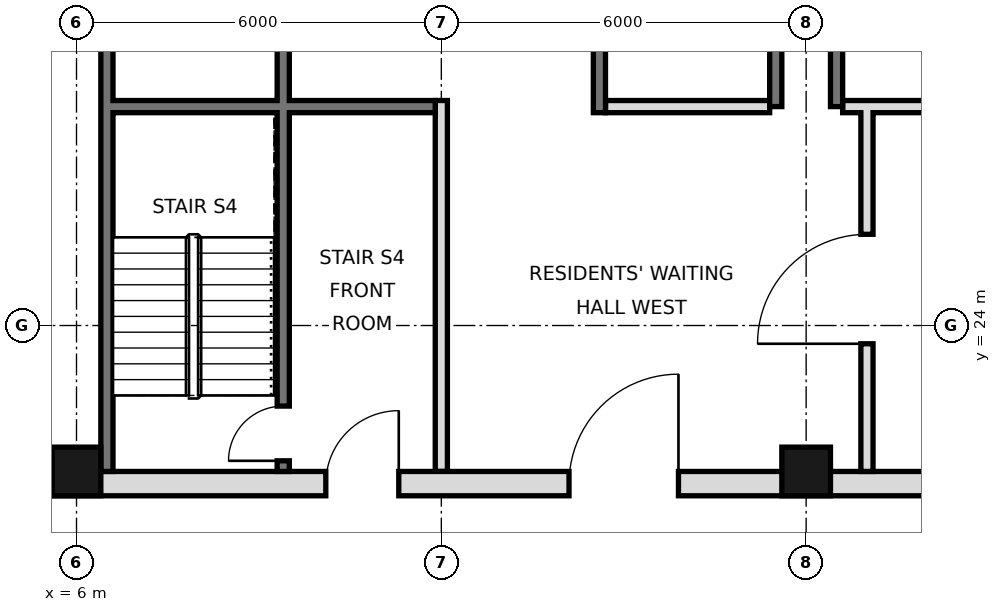
"""IFC4 building model, lengths in metres.
Left out: names, types, materials, properties, quantities, classifications, styles, units other than length and angle.
Written with IfcOpenShell. Run it as: python <this file> out.ifc"""

import sys

from ifc_helpers import new_model, si_unit, direction, frame, frame_2d, origin, origin_2d, place, context, subcontext, project, spatial, rectangle, hollow_rectangle, extrude, element, fill, save


model = new_model("IFC4")
c1 = context("Model", 3, precision=1e-05, world=origin(), true_north=direction((0.0, 1.0)))
c2 = subcontext(c1, "Body", "Model", "MODEL_VIEW")
j1 = project(units=[si_unit("LENGTHUNIT", "METRE"), si_unit("PLANEANGLEUNIT", "RADIAN")], contexts=[c1])
p1 = place(None, origin())
s1 = spatial("IfcSite", under=j1, at=p1, CompositionType="ELEMENT")
p2 = place(p1, origin())
s2 = spatial("IfcBuilding", under=s1, at=p2, CompositionType="ELEMENT")
p3 = place(p2, frame((0.0, 0.0, 316.0)))
s3 = spatial("IfcBuildingStorey", under=s2, at=p3, CompositionType="ELEMENT", Elevation=316.0)
for number, where, z_axis, x_axis in (
    (1, (6.0, 21.6, 0.0), (0.0, 0.0, 1.0), (1.0, 0.0, 0.0)),
    (2, (18.0, 21.6, 0.0), (0.0, 0.0, 1.0), (1.0, 0.0, 0.0)),
):
    element("IfcColumn", number, at=place(p3, frame(where, z_axis=z_axis, x_axis=x_axis)), inside=s3, PredefinedType="COLUMN", context=c2, shape_type="SweptSolid", body=[
        extrude(hollow_rectangle(XDim=0.8, YDim=0.8, WallThickness=0.025, at=origin_2d()), origin(), (0.0, 0.0, 1.0), 3.6),
    ])
p4 = place(p3, frame((6.5, 21.6, 0.0), z_axis=(0.0, 0.0, 1.0), x_axis=(0.0, 1.0, 0.0)))
e3 = element("IfcWall", 3, at=p4, inside=s3, PredefinedType="SOLIDWALL", context=c2, shape_type="SweptSolid", body=[
    extrude(rectangle(XDim=23.5, YDim=0.2, at=frame_2d((11.75, 0.0))), origin(), (0.0, 0.0, 1.0), 3.42),
])
for number, where, z_axis, x_axis in (
    (4, (17.5, 27.6, 0.0), (0.0, 0.0, 1.0), (0.0, 1.0, 0.0)),
    (5, (18.5, 27.6, 0.0), (0.0, 0.0, 1.0), (0.0, 1.0, 0.0)),
):
    element("IfcWall", number, at=place(p3, frame(where, z_axis=z_axis, x_axis=x_axis)), inside=s3, PredefinedType="SOLIDWALL", context=c2, shape_type="SweptSolid", body=[
        extrude(rectangle(XDim=17.5, YDim=0.2, at=frame_2d((8.75, 0.0))), origin(), (0.0, 0.0, 1.0), 3.42),
    ])
p5 = place(p3, frame((5.6, 21.4, 0.0), z_axis=(0.0, 0.0, 1.0), x_axis=(1.0, 0.0, 0.0)))
e6 = element("IfcWall", 6, at=p5, inside=s3, PredefinedType="SOLIDWALL", context=c2, shape_type="SweptSolid", body=[
    extrude(rectangle(XDim=36.8, YDim=0.4, at=frame_2d((18.4, 0.0))), origin(), (0.0, 0.0, 1.0), 3.42),
])
p6 = place(p5, frame((8.5, 0.0, 0.0)))
e7 = element("IfcOpeningElement", 7, at=p6, cuts=e6, PredefinedType="OPENING", context=c2, shape_type="SweptSolid", body=[
    extrude(rectangle(XDim=1.8, YDim=2.1, at=frame_2d((0.9, 1.05))), frame((0.0, 0.21, 0.0), z_axis=(0.0, -1.0, 0.0), x_axis=(1.0, 0.0, 0.0)), (0.0, 0.0, 1.0), 0.42),
])
p7 = place(p5, frame((17.5, 0.0, 0.0)))
e8 = element("IfcOpeningElement", 8, at=p7, cuts=e6, PredefinedType="OPENING", context=c2, shape_type="SweptSolid", body=[
    extrude(rectangle(XDim=1.8, YDim=2.1, at=frame_2d((0.9, 1.05))), frame((0.0, 0.21, 0.0), z_axis=(0.0, -1.0, 0.0), x_axis=(1.0, 0.0, 0.0)), (0.0, 0.0, 1.0), 0.42),
])
p8 = place(p5, frame((26.5, 0.0, 0.0)))
e9 = element("IfcOpeningElement", 9, at=p8, cuts=e6, PredefinedType="OPENING", context=c2, shape_type="SweptSolid", body=[
    extrude(rectangle(XDim=1.8, YDim=2.1, at=frame_2d((0.9, 1.05))), frame((0.0, 0.21, 0.0), z_axis=(0.0, -1.0, 0.0), x_axis=(1.0, 0.0, 0.0)), (0.0, 0.0, 1.0), 0.42),
])
p9 = place(p5, frame((4.5, 0.0, 0.0)))
e10 = element("IfcOpeningElement", 10, at=p9, cuts=e6, PredefinedType="OPENING", context=c2, shape_type="SweptSolid", body=[
    extrude(rectangle(XDim=1.2, YDim=2.1, at=frame_2d((0.6, 1.05))), frame((0.0, 0.21, 0.0), z_axis=(0.0, -1.0, 0.0), x_axis=(1.0, 0.0, 0.0)), (0.0, 0.0, 1.0), 0.42),
])
p10 = place(p5, frame((31.1, 0.0, 0.0)))
e11 = element("IfcOpeningElement", 11, at=p10, cuts=e6, PredefinedType="OPENING", context=c2, shape_type="SweptSolid", body=[
    extrude(rectangle(XDim=1.2, YDim=2.1, at=frame_2d((0.6, 1.05))), frame((0.0, 0.21, 0.0), z_axis=(0.0, -1.0, 0.0), x_axis=(1.0, 0.0, 0.0)), (0.0, 0.0, 1.0), 0.42),
])
p11 = place(p3, frame((19.0, 21.6, 0.0), z_axis=(0.0, 0.0, 1.0), x_axis=(0.0, 1.0, 0.0)))
e12 = element("IfcWall", 12, at=p11, inside=s3, PredefinedType="PARTITIONING", context=c2, shape_type="SweptSolid", body=[
    extrude(rectangle(XDim=6.0, YDim=0.2, at=frame_2d((3.0, 0.0))), origin(), (0.0, 0.0, 1.0), 3.42),
])
p12 = place(p11, frame((2.1, 0.0, 0.0)))
e13 = element("IfcOpeningElement", 13, at=p12, cuts=e12, PredefinedType="OPENING", context=c2, shape_type="SweptSolid", body=[
    extrude(rectangle(XDim=1.8, YDim=2.1, at=frame_2d((0.9, 1.05))), frame((0.0, 0.11, 0.0), z_axis=(0.0, -1.0, 0.0), x_axis=(1.0, 0.0, 0.0)), (0.0, 0.0, 1.0), 0.22),
])
p13 = place(p3, frame((12.0, 21.6, 0.0), z_axis=(0.0, 0.0, 1.0), x_axis=(0.0, 1.0, 0.0)))
e14 = element("IfcWall", 14, at=p13, inside=s3, PredefinedType="PARTITIONING", context=c2, shape_type="SweptSolid", body=[
    extrude(rectangle(XDim=6.1, YDim=0.2, at=frame_2d((3.05, 0.0))), origin(), (0.0, 0.0, 1.0), 3.42),
])
p14 = place(p3, frame((14.6, 27.5, 0.0), z_axis=(0.0, 0.0, 1.0), x_axis=(0.0, 1.0, 0.0)))
e15 = element("IfcWall", 15, at=p14, inside=s3, PredefinedType="SOLIDWALL", context=c2, shape_type="SweptSolid", body=[
    extrude(rectangle(XDim=17.5, YDim=0.2, at=frame_2d((8.75, 0.0))), origin(), (0.0, 0.0, 1.0), 3.42),
])
p15 = place(p14, frame((15.4, 0.0, 0.0)))
e16 = element("IfcOpeningElement", 16, at=p15, cuts=e15, PredefinedType="OPENING", context=c2, shape_type="SweptSolid", body=[
    extrude(rectangle(XDim=1.1, YDim=2.1, at=frame_2d((0.55, 1.05))), frame((0.0, 0.11, 0.0), z_axis=(0.0, -1.0, 0.0), x_axis=(1.0, 0.0, 0.0)), (0.0, 0.0, 1.0), 0.22),
])
p16 = place(p14, frame((2.7, 0.0, 0.0)))
e17 = element("IfcOpeningElement", 17, at=p16, cuts=e15, PredefinedType="OPENING", context=c2, shape_type="SweptSolid", body=[
    extrude(rectangle(XDim=1.0, YDim=2.1, at=frame_2d((0.5, 1.05))), frame((0.0, 0.11, 0.0), z_axis=(0.0, -1.0, 0.0), x_axis=(1.0, 0.0, 0.0)), (0.0, 0.0, 1.0), 0.22),
])
p17 = place(p14, frame((9.9, 0.0, 0.0)))
e18 = element("IfcOpeningElement", 18, at=p17, cuts=e15, PredefinedType="OPENING", context=c2, shape_type="SweptSolid", body=[
    extrude(rectangle(XDim=0.9, YDim=2.1, at=frame_2d((0.45, 1.05))), frame((0.0, 0.11, 0.0), z_axis=(0.0, -1.0, 0.0), x_axis=(1.0, 0.0, 0.0)), (0.0, 0.0, 1.0), 0.22),
])
p18 = place(p3, frame((9.4, 21.6, 0.0), z_axis=(0.0, 0.0, 1.0), x_axis=(0.0, 1.0, 0.0)))
e19 = element("IfcWall", 19, at=p18, inside=s3, PredefinedType="SOLIDWALL", context=c2, shape_type="SweptSolid", body=[
    extrude(rectangle(XDim=23.4, YDim=0.2, at=frame_2d((11.7, 0.0))), origin(), (0.0, 0.0, 1.0), 3.42),
])
p19 = place(p18, frame((7.95, 0.0, 0.0)))
e20 = element("IfcOpeningElement", 20, at=p19, cuts=e19, PredefinedType="OPENING", context=c2, shape_type="SweptSolid", body=[
    extrude(rectangle(XDim=1.0, YDim=2.1, at=frame_2d((0.5, 1.05))), frame((0.0, 0.11, 0.0), z_axis=(0.0, -1.0, 0.0), x_axis=(1.0, 0.0, 0.0)), (0.0, 0.0, 1.0), 0.22),
])
p20 = place(p18, frame((12.6, 0.0, 0.0)))
e21 = element("IfcOpeningElement", 21, at=p20, cuts=e19, PredefinedType="OPENING", context=c2, shape_type="SweptSolid", body=[
    extrude(rectangle(XDim=1.0, YDim=2.1, at=frame_2d((0.5, 1.05))), frame((0.0, 0.11, 0.0), z_axis=(0.0, -1.0, 0.0), x_axis=(1.0, 0.0, 0.0)), (0.0, 0.0, 1.0), 0.22),
])
p21 = place(p18, frame((22.1, 0.0, 0.0)))
e22 = element("IfcOpeningElement", 22, at=p21, cuts=e19, PredefinedType="OPENING", context=c2, shape_type="SweptSolid", body=[
    extrude(rectangle(XDim=1.0, YDim=2.1, at=frame_2d((0.5, 1.05))), frame((0.0, 0.11, 0.0), z_axis=(0.0, -1.0, 0.0), x_axis=(1.0, 0.0, 0.0)), (0.0, 0.0, 1.0), 0.22),
])
p22 = place(p18, frame((0.175, 0.0, 0.0)))
e23 = element("IfcOpeningElement", 23, at=p22, cuts=e19, PredefinedType="OPENING", context=c2, shape_type="SweptSolid", body=[
    extrude(rectangle(XDim=0.9, YDim=2.1, at=frame_2d((0.45, 1.05))), frame((0.0, 0.11, 0.0), z_axis=(0.0, -1.0, 0.0), x_axis=(1.0, 0.0, 0.0)), (0.0, 0.0, 1.0), 0.22),
])
for number, where, z_axis, x_axis in (
    (24, (14.7, 27.6, 0.0), (0.0, 0.0, 1.0), (1.0, 0.0, 0.0)),
    (25, (18.6, 27.6, 0.0), (0.0, 0.0, 1.0), (1.0, 0.0, 0.0)),
):
    element("IfcWall", number, at=place(p3, frame(where, z_axis=z_axis, x_axis=x_axis)), inside=s3, PredefinedType="PARTITIONING", context=c2, shape_type="SweptSolid", body=[
        extrude(rectangle(XDim=2.7, YDim=0.2, at=frame_2d((1.35, 0.0))), origin(), (0.0, 0.0, 1.0), 3.42),
    ])
p23 = place(p3, frame((6.6, 27.6, 0.0), z_axis=(0.0, 0.0, 1.0), x_axis=(1.0, 0.0, 0.0)))
e26 = element("IfcWall", 26, at=p23, inside=s3, PredefinedType="SOLIDWALL", context=c2, shape_type="SweptSolid", body=[
    extrude(rectangle(XDim=5.3, YDim=0.2, at=frame_2d((2.65, 0.0))), origin(), (0.0, 0.0, 1.0), 3.42),
])
p24 = place(p6, frame((1.8, 0.0, 0.0), z_axis=(0.0, 0.0, 1.0), x_axis=(-1.0, 0.0, 0.0)))
e27 = element("IfcDoor", 27, at=p24, inside=s3, OperationType="SINGLE_SWING_LEFT", PredefinedType="DOOR", context=c2, shape_type="SweptSolid", body=[
    extrude(rectangle(XDim=1.8, YDim=2.1, at=frame_2d((0.9, 1.05))), frame((0.0, 0.025, 0.0), z_axis=(0.0, -1.0, 0.0), x_axis=(1.0, 0.0, 0.0)), (0.0, 0.0, 1.0), 0.05),
])
fill(e7, e27)
p25 = place(p12, origin())
e28 = element("IfcDoor", 28, at=p25, inside=s3, OperationType="SINGLE_SWING_LEFT", PredefinedType="DOOR", context=c2, shape_type="SweptSolid", body=[
    extrude(rectangle(XDim=1.8, YDim=2.1, at=frame_2d((0.9, 1.05))), frame((0.0, 0.025, 0.0), z_axis=(0.0, -1.0, 0.0), x_axis=(1.0, 0.0, 0.0)), (0.0, 0.0, 1.0), 0.05),
])
fill(e13, e28)
p26 = place(p9, frame((1.2, 0.0, 0.0), z_axis=(0.0, 0.0, 1.0), x_axis=(-1.0, 0.0, 0.0)))
e29 = element("IfcDoor", 29, at=p26, inside=s3, OperationType="SINGLE_SWING_LEFT", PredefinedType="DOOR", context=c2, shape_type="SweptSolid", body=[
    extrude(rectangle(XDim=1.2, YDim=2.1, at=frame_2d((0.6, 1.05))), frame((0.0, 0.025, 0.0), z_axis=(0.0, -1.0, 0.0), x_axis=(1.0, 0.0, 0.0)), (0.0, 0.0, 1.0), 0.05),
])
fill(e10, e29)
p27 = place(p22, origin())
e30 = element("IfcDoor", 30, at=p27, inside=s3, OperationType="SINGLE_SWING_LEFT", PredefinedType="DOOR", context=c2, shape_type="SweptSolid", body=[
    extrude(rectangle(XDim=0.9, YDim=2.1, at=frame_2d((0.45, 1.05))), frame((0.0, 0.025, 0.0), z_axis=(0.0, -1.0, 0.0), x_axis=(1.0, 0.0, 0.0)), (0.0, 0.0, 1.0), 0.05),
])
fill(e23, e30)
save(model, sys.argv[1])
